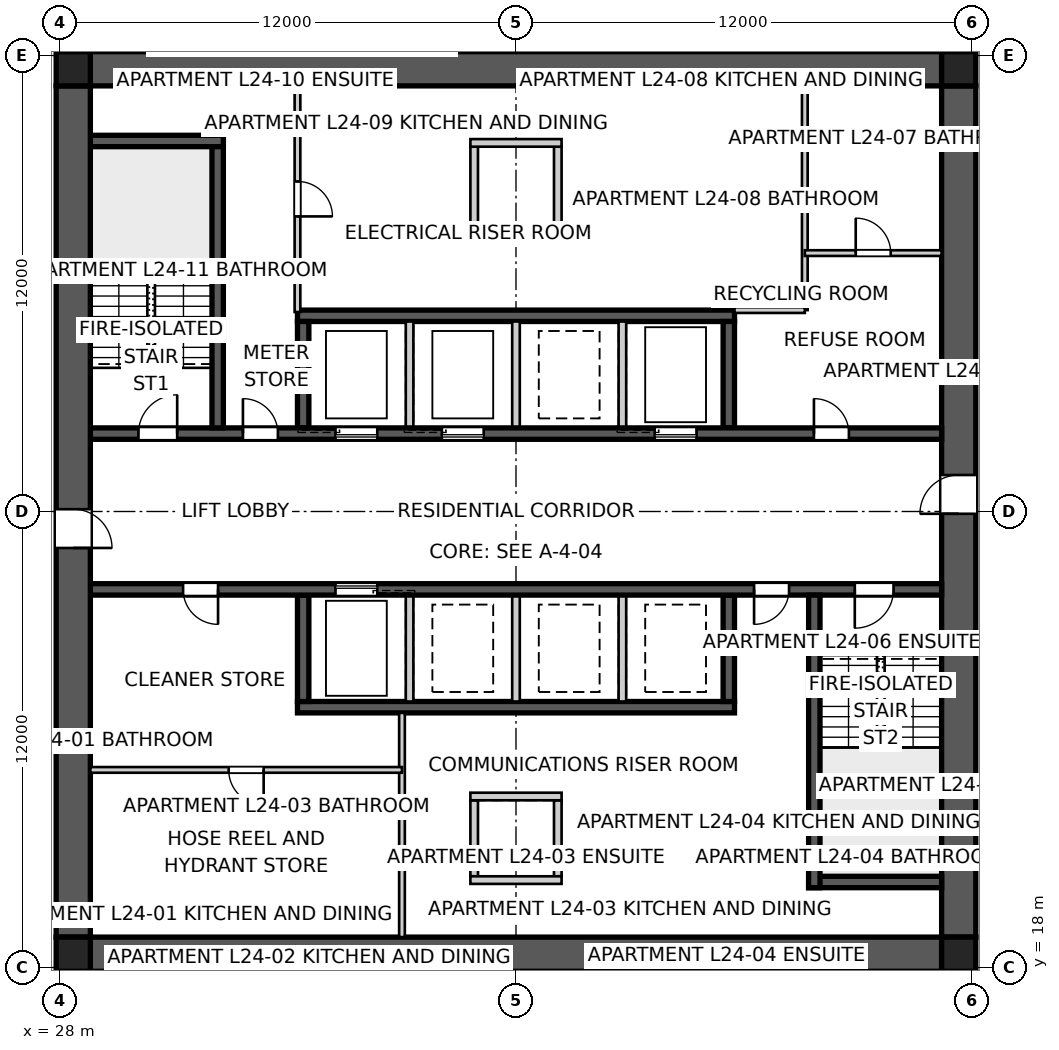
"""IFC4 building model, lengths in metres.
Left out: names, types, materials, properties, quantities, classifications, styles, units other than length and angle.
Written with IfcOpenShell. Run it as: python <this file> out.ifc"""

import sys

from ifc_helpers import new_model, si_unit, direction, frame, frame_2d, origin, origin_2d, place, context, subcontext, project, spatial, polyline, rectangle, outline, extrude, element, fill, save


model = new_model("IFC4")
c1 = context("Model", 3, precision=1e-05, world=origin(), true_north=direction((0.0, 1.0)))
c2 = subcontext(c1, "Body", "Model", "MODEL_VIEW")
j1 = project(units=[si_unit("LENGTHUNIT", "METRE"), si_unit("PLANEANGLEUNIT", "RADIAN")], contexts=[c1])
p1 = place(None, origin())
s1 = spatial("IfcSite", under=j1, at=p1, CompositionType="ELEMENT")
p2 = place(p1, origin())
s2 = spatial("IfcBuilding", under=s1, at=p2, CompositionType="ELEMENT")
p3 = place(p2, frame((0.0, 0.0, 89.6)))
s3 = spatial("IfcBuildingStorey", under=s2, at=p3, CompositionType="ELEMENT", Elevation=89.6)
for number, where, z_axis, x_axis in (
    (1, (28.8, 41.65, 0.0), (0.0, 0.0, 1.0), (1.0, 0.0, 0.0)),
    (2, (51.2, 18.35, 0.0), (0.0, 0.0, 1.0), (-1.0, 0.0, 0.0)),
):
    element("IfcWall", number, at=place(p3, frame(where, z_axis=z_axis, x_axis=x_axis)), inside=s3, PredefinedType="SHEAR", context=c2, shape_type="SweptSolid", body=[
        extrude(outline(polyline([(0.0, -0.45), (22.4, -0.45), (22.4, -0.025), (22.85, -0.025), (22.85, 0.025), (22.4, 0.025), (22.4, 0.45), (0.0, 0.45), (0.0, 0.025), (-0.45, 0.025), (-0.45, -0.025), (0.0, -0.025), (0.0, -0.45)])), origin(), (0.0, 0.0, 1.0), 3.4),
    ])
p4 = place(p3, frame((51.65, 18.8, 0.0), z_axis=(0.0, 0.0, 1.0), x_axis=(0.0, 1.0, 0.0)))
e3 = element("IfcWall", 3, at=p4, inside=s3, PredefinedType="SHEAR", context=c2, shape_type="SweptSolid", body=[
    extrude(outline(polyline([(0.0, -0.45), (22.4, -0.45), (22.4, -0.025), (22.85, -0.025), (22.85, 0.025), (22.4, 0.025), (22.4, 0.45), (0.0, 0.45), (0.0, 0.025), (-0.45, 0.025), (-0.45, -0.025), (0.0, -0.025), (0.0, -0.45)])), origin(), (0.0, 0.0, 1.0), 3.4),
])
p5 = place(p4, frame((11.14, 0.0, 0.0)))
e4 = element("IfcOpeningElement", 4, at=p5, cuts=e3, PredefinedType="OPENING", context=c2, shape_type="SweptSolid", body=[
    extrude(rectangle(XDim=1.02, YDim=2.4, at=frame_2d((0.51, 1.2))), frame((0.0, 0.46, 0.0), z_axis=(0.0, -1.0, 0.0), x_axis=(1.0, 0.0, 0.0)), (0.0, 0.0, 1.0), 0.92),
])
p6 = place(p3, frame((28.35, 41.2, 0.0), z_axis=(0.0, 0.0, 1.0), x_axis=(0.0, -1.0, 0.0)))
e5 = element("IfcWall", 5, at=p6, inside=s3, PredefinedType="SHEAR", context=c2, shape_type="SweptSolid", body=[
    extrude(outline(polyline([(0.0, -0.45), (22.4, -0.45), (22.4, -0.025), (22.85, -0.025), (22.85, 0.025), (22.4, 0.025), (22.4, 0.45), (0.0, 0.45), (0.0, 0.025), (-0.45, 0.025), (-0.45, -0.025), (0.0, -0.025), (0.0, -0.45)])), origin(), (0.0, 0.0, 1.0), 3.4),
])
p7 = place(p6, frame((11.14, 0.0, 0.0)))
e6 = element("IfcOpeningElement", 6, at=p7, cuts=e5, PredefinedType="OPENING", context=c2, shape_type="SweptSolid", body=[
    extrude(rectangle(XDim=1.02, YDim=2.4, at=frame_2d((0.51, 1.2))), frame((0.0, 0.46, 0.0), z_axis=(0.0, -1.0, 0.0), x_axis=(1.0, 0.0, 0.0)), (0.0, 0.0, 1.0), 0.92),
])
p8 = place(p3, frame((28.8, 32.05, 0.0), z_axis=(0.0, 0.0, 1.0), x_axis=(1.0, 0.0, 0.0)))
e7 = element("IfcWall", 7, at=p8, inside=s3, PredefinedType="SHEAR", context=c2, shape_type="SweptSolid", body=[
    extrude(rectangle(XDim=22.4, YDim=0.3, at=frame_2d((11.2, 0.0))), origin(), (0.0, 0.0, 1.0), 3.4),
])
p9 = place(p8, frame((19.04, 0.0, 0.0)))
e8 = element("IfcOpeningElement", 8, at=p9, cuts=e7, PredefinedType="OPENING", context=c2, shape_type="SweptSolid", body=[
    extrude(rectangle(XDim=0.92, YDim=2.1, at=frame_2d((0.46, 1.05))), frame((0.0, 0.16, 0.0), z_axis=(0.0, -1.0, 0.0), x_axis=(1.0, 0.0, 0.0)), (0.0, 0.0, 1.0), 0.32),
])
p10 = place(p8, frame((1.265, 0.0, 0.0)))
e9 = element("IfcOpeningElement", 9, at=p10, cuts=e7, PredefinedType="OPENING", context=c2, shape_type="SweptSolid", body=[
    extrude(rectangle(XDim=1.02, YDim=2.1, at=frame_2d((0.51, 1.05))), frame((0.0, 0.16, 0.0), z_axis=(0.0, -1.0, 0.0), x_axis=(1.0, 0.0, 0.0)), (0.0, 0.0, 1.0), 0.32),
])
p11 = place(p8, frame((4.015, 0.0, 0.0)))
e10 = element("IfcOpeningElement", 10, at=p11, cuts=e7, PredefinedType="OPENING", context=c2, shape_type="SweptSolid", body=[
    extrude(rectangle(XDim=0.92, YDim=2.1, at=frame_2d((0.46, 1.05))), frame((0.0, 0.16, 0.0), z_axis=(0.0, -1.0, 0.0), x_axis=(1.0, 0.0, 0.0)), (0.0, 0.0, 1.0), 0.32),
])
p12 = place(p8, frame((6.45, 0.0, 0.0)))
e11 = element("IfcOpeningElement", 11, at=p12, cuts=e7, PredefinedType="OPENING", context=c2, shape_type="SweptSolid", body=[
    extrude(rectangle(XDim=1.1, YDim=2.1, at=frame_2d((0.55, 1.05))), frame((0.0, 0.16, 0.0), z_axis=(0.0, -1.0, 0.0), x_axis=(1.0, 0.0, 0.0)), (0.0, 0.0, 1.0), 0.32),
])
p13 = place(p8, frame((9.25, 0.0, 0.0)))
e12 = element("IfcOpeningElement", 12, at=p13, cuts=e7, PredefinedType="OPENING", context=c2, shape_type="SweptSolid", body=[
    extrude(rectangle(XDim=1.1, YDim=2.1, at=frame_2d((0.55, 1.05))), frame((0.0, 0.16, 0.0), z_axis=(0.0, -1.0, 0.0), x_axis=(1.0, 0.0, 0.0)), (0.0, 0.0, 1.0), 0.32),
])
p14 = place(p8, frame((14.85, 0.0, 0.0)))
e13 = element("IfcOpeningElement", 13, at=p14, cuts=e7, PredefinedType="OPENING", context=c2, shape_type="SweptSolid", body=[
    extrude(rectangle(XDim=1.1, YDim=2.1, at=frame_2d((0.55, 1.05))), frame((0.0, 0.16, 0.0), z_axis=(0.0, -1.0, 0.0), x_axis=(1.0, 0.0, 0.0)), (0.0, 0.0, 1.0), 0.32),
])
p15 = place(p3, frame((51.2, 27.95, 0.0), z_axis=(0.0, 0.0, 1.0), x_axis=(-1.0, 0.0, 0.0)))
e14 = element("IfcWall", 14, at=p15, inside=s3, PredefinedType="SHEAR", context=c2, shape_type="SweptSolid", body=[
    extrude(rectangle(XDim=22.4, YDim=0.3, at=frame_2d((11.2, 0.0))), origin(), (0.0, 0.0, 1.0), 3.4),
])
p16 = place(p15, frame((19.04, 0.0, 0.0)))
e15 = element("IfcOpeningElement", 15, at=p16, cuts=e14, PredefinedType="OPENING", context=c2, shape_type="SweptSolid", body=[
    extrude(rectangle(XDim=0.92, YDim=2.1, at=frame_2d((0.46, 1.05))), frame((0.0, 0.16, 0.0), z_axis=(0.0, -1.0, 0.0), x_axis=(1.0, 0.0, 0.0)), (0.0, 0.0, 1.0), 0.32),
])
p17 = place(p15, frame((1.265, 0.0, 0.0)))
e16 = element("IfcOpeningElement", 16, at=p17, cuts=e14, PredefinedType="OPENING", context=c2, shape_type="SweptSolid", body=[
    extrude(rectangle(XDim=1.02, YDim=2.1, at=frame_2d((0.51, 1.05))), frame((0.0, 0.16, 0.0), z_axis=(0.0, -1.0, 0.0), x_axis=(1.0, 0.0, 0.0)), (0.0, 0.0, 1.0), 0.32),
])
p18 = place(p15, frame((4.015, 0.0, 0.0)))
e17 = element("IfcOpeningElement", 17, at=p18, cuts=e14, PredefinedType="OPENING", context=c2, shape_type="SweptSolid", body=[
    extrude(rectangle(XDim=0.92, YDim=2.1, at=frame_2d((0.46, 1.05))), frame((0.0, 0.16, 0.0), z_axis=(0.0, -1.0, 0.0), x_axis=(1.0, 0.0, 0.0)), (0.0, 0.0, 1.0), 0.32),
])
p19 = place(p15, frame((14.85, 0.0, 0.0)))
e18 = element("IfcOpeningElement", 18, at=p19, cuts=e14, PredefinedType="OPENING", context=c2, shape_type="SweptSolid", body=[
    extrude(rectangle(XDim=1.1, YDim=2.1, at=frame_2d((0.55, 1.05))), frame((0.0, 0.16, 0.0), z_axis=(0.0, -1.0, 0.0), x_axis=(1.0, 0.0, 0.0)), (0.0, 0.0, 1.0), 0.32),
])
for number, where, z_axis, x_axis in (
    (19, (34.25, 35.15, 0.0), (0.0, 0.0, 1.0), (1.0, 0.0, 0.0)),
    (20, (45.75, 24.85, 0.0), (0.0, 0.0, 1.0), (-1.0, 0.0, 0.0)),
):
    element("IfcWall", number, at=place(p3, frame(where, z_axis=z_axis, x_axis=x_axis)), inside=s3, PredefinedType="SHEAR", context=c2, shape_type="SweptSolid", body=[
        extrude(rectangle(XDim=11.5, YDim=0.3, at=frame_2d((5.75, 0.0))), origin(), (0.0, 0.0, 1.0), 3.4),
    ])
for number, where, z_axis, x_axis in (
    (21, (34.4, 32.2, 0.0), (0.0, 0.0, 1.0), (0.0, 1.0, 0.0)),
    (22, (45.6, 27.8, 0.0), (0.0, 0.0, 1.0), (0.0, -1.0, 0.0)),
):
    element("IfcWall", number, at=place(p3, frame(where, z_axis=z_axis, x_axis=x_axis)), inside=s3, PredefinedType="SHEAR", context=c2, shape_type="SweptSolid", body=[
        extrude(rectangle(XDim=2.8, YDim=0.3, at=frame_2d((1.4, 0.0))), origin(), (0.0, 0.0, 1.0), 3.4),
    ])
for number, where, z_axis, x_axis in (
    (23, (37.2, 32.2, 0.0), (0.0, 0.0, 1.0), (0.0, 1.0, 0.0)),
    (24, (42.8, 27.8, 0.0), (0.0, 0.0, 1.0), (0.0, -1.0, 0.0)),
    (25, (40.0, 32.2, 0.0), (0.0, 0.0, 1.0), (0.0, 1.0, 0.0)),
    (26, (40.0, 27.8, 0.0), (0.0, 0.0, 1.0), (0.0, -1.0, 0.0)),
    (27, (42.8, 32.2, 0.0), (0.0, 0.0, 1.0), (0.0, 1.0, 0.0)),
    (28, (37.2, 27.8, 0.0), (0.0, 0.0, 1.0), (0.0, -1.0, 0.0)),
):
    element("IfcWall", number, at=place(p3, frame(where, z_axis=z_axis, x_axis=x_axis)), inside=s3, PredefinedType="SOLIDWALL", context=c2, shape_type="SweptSolid", body=[
        extrude(rectangle(XDim=2.8, YDim=0.2, at=frame_2d((1.4, 0.0))), origin(), (0.0, 0.0, 1.0), 3.4),
    ])
for number, where, z_axis, x_axis in (
    (29, (45.6, 32.2, 0.0), (0.0, 0.0, 1.0), (0.0, 1.0, 0.0)),
    (30, (34.4, 27.8, 0.0), (0.0, 0.0, 1.0), (0.0, -1.0, 0.0)),
):
    element("IfcWall", number, at=place(p3, frame(where, z_axis=z_axis, x_axis=x_axis)), inside=s3, PredefinedType="SHEAR", context=c2, shape_type="SweptSolid", body=[
        extrude(rectangle(XDim=2.8, YDim=0.3, at=frame_2d((1.4, 0.0))), origin(), (0.0, 0.0, 1.0), 3.4),
    ])
p20 = place(p3, frame((32.15, 32.2, 0.0), z_axis=(0.0, 0.0, 1.0), x_axis=(0.0, 1.0, 0.0)))
e31 = element("IfcWall", 31, at=p20, inside=s3, PredefinedType="SHEAR", context=c2, shape_type="SweptSolid", body=[
    extrude(rectangle(XDim=7.7, YDim=0.3, at=frame_2d((3.85, 0.0))), origin(), (0.0, 0.0, 1.0), 3.4),
])
p21 = place(p3, frame((28.8, 39.75, 0.0), z_axis=(0.0, 0.0, 1.0), x_axis=(1.0, 0.0, 0.0)))
e32 = element("IfcWall", 32, at=p21, inside=s3, PredefinedType="SHEAR", context=c2, shape_type="SweptSolid", body=[
    extrude(rectangle(XDim=3.5, YDim=0.3, at=frame_2d((1.75, 0.0))), origin(), (0.0, 0.0, 1.0), 3.4),
])
p22 = place(p3, frame((47.85, 27.8, 0.0), z_axis=(0.0, 0.0, 1.0), x_axis=(0.0, -1.0, 0.0)))
e33 = element("IfcWall", 33, at=p22, inside=s3, PredefinedType="SHEAR", context=c2, shape_type="SweptSolid", body=[
    extrude(rectangle(XDim=7.7, YDim=0.3, at=frame_2d((3.85, 0.0))), origin(), (0.0, 0.0, 1.0), 3.4),
])
p23 = place(p3, frame((51.2, 20.25, 0.0), z_axis=(0.0, 0.0, 1.0), x_axis=(-1.0, 0.0, 0.0)))
e34 = element("IfcWall", 34, at=p23, inside=s3, PredefinedType="SHEAR", context=c2, shape_type="SweptSolid", body=[
    extrude(rectangle(XDim=3.5, YDim=0.3, at=frame_2d((1.75, 0.0))), origin(), (0.0, 0.0, 1.0), 3.4),
])
for number, where, z_axis, x_axis in (
    (35, (38.9, 37.6, 0.0), (0.0, 0.0, 1.0), (0.0, 1.0, 0.0)),
    (36, (41.1, 37.6, 0.0), (0.0, 0.0, 1.0), (0.0, 1.0, 0.0)),
):
    element("IfcWall", number, at=place(p3, frame(where, z_axis=z_axis, x_axis=x_axis)), inside=s3, PredefinedType="SOLIDWALL", context=c2, shape_type="SweptSolid", body=[
        extrude(rectangle(XDim=2.0, YDim=0.2, at=frame_2d((1.0, 0.0))), origin(), (0.0, 0.0, 1.0), 3.4),
    ])
for number, where, z_axis, x_axis in (
    (37, (38.8, 37.5, 0.0), (0.0, 0.0, 1.0), (1.0, 0.0, 0.0)),
    (38, (38.8, 39.7, 0.0), (0.0, 0.0, 1.0), (1.0, 0.0, 0.0)),
):
    element("IfcWall", number, at=place(p3, frame(where, z_axis=z_axis, x_axis=x_axis)), inside=s3, PredefinedType="SOLIDWALL", context=c2, shape_type="SweptSolid", body=[
        extrude(rectangle(XDim=2.4, YDim=0.2, at=frame_2d((1.2, 0.0))), origin(), (0.0, 0.0, 1.0), 3.4),
    ])
for number, where, z_axis, x_axis in (
    (39, (38.9, 22.4, 0.0), (0.0, 0.0, 1.0), (0.0, -1.0, 0.0)),
    (40, (41.1, 22.4, 0.0), (0.0, 0.0, 1.0), (0.0, -1.0, 0.0)),
):
    element("IfcWall", number, at=place(p3, frame(where, z_axis=z_axis, x_axis=x_axis)), inside=s3, PredefinedType="SOLIDWALL", context=c2, shape_type="SweptSolid", body=[
        extrude(rectangle(XDim=2.0, YDim=0.2, at=frame_2d((1.0, 0.0))), origin(), (0.0, 0.0, 1.0), 3.4),
    ])
for number, where, z_axis, x_axis in (
    (41, (38.8, 22.5, 0.0), (0.0, 0.0, 1.0), (1.0, 0.0, 0.0)),
    (42, (38.8, 20.3, 0.0), (0.0, 0.0, 1.0), (1.0, 0.0, 0.0)),
):
    element("IfcWall", number, at=place(p3, frame(where, z_axis=z_axis, x_axis=x_axis)), inside=s3, PredefinedType="SOLIDWALL", context=c2, shape_type="SweptSolid", body=[
        extrude(rectangle(XDim=2.4, YDim=0.2, at=frame_2d((1.2, 0.0))), origin(), (0.0, 0.0, 1.0), 3.4),
    ])
for number, where, z_axis, x_axis in (
    (43, (28.35, 18.35, 0.0), (0.0, 0.0, 1.0), (1.0, 0.0, 0.0)),
    (44, (51.65, 18.35, 0.0), (0.0, 0.0, 1.0), (1.0, 0.0, 0.0)),
    (45, (51.65, 41.65, 0.0), (0.0, 0.0, 1.0), (1.0, 0.0, 0.0)),
    (46, (28.35, 41.65, 0.0), (0.0, 0.0, 1.0), (1.0, 0.0, 0.0)),
):
    element("IfcColumn", number, at=place(p3, frame(where, z_axis=z_axis, x_axis=x_axis)), inside=s3, PredefinedType="COLUMN", context=c2, shape_type="SweptSolid", body=[
        extrude(rectangle(XDim=0.9, YDim=0.9, at=origin_2d()), origin(), (0.0, 0.0, 1.0), 3.4),
    ])
p24 = place(p3, frame((34.25, 41.2, 0.0), z_axis=(0.0, 0.0, 1.0), x_axis=(0.0, -1.0, 0.0)))
e47 = element("IfcWall", 47, at=p24, inside=s3, PredefinedType="SOLIDWALL", context=c2, shape_type="SweptSolid", body=[
    extrude(rectangle(XDim=5.95, YDim=0.15, at=frame_2d((2.975, 0.0))), origin(), (0.0, 0.0, 1.0), 3.25),
])
p25 = place(p24, frame((2.515, 0.0, 0.0)))
e48 = element("IfcOpeningElement", 48, at=p25, cuts=e47, PredefinedType="OPENING", context=c2, shape_type="SweptSolid", body=[
    extrude(rectangle(XDim=0.92, YDim=2.1, at=frame_2d((0.46, 1.05))), frame((0.0, 0.085, 0.0), z_axis=(0.0, -1.0, 0.0), x_axis=(1.0, 0.0, 0.0)), (0.0, 0.0, 1.0), 0.17),
])
p26 = place(p3, frame((47.6, 41.2, 0.0), z_axis=(0.0, 0.0, 1.0), x_axis=(0.0, -1.0, 0.0)))
e49 = element("IfcWall", 49, at=p26, inside=s3, PredefinedType="SOLIDWALL", context=c2, shape_type="SweptSolid", body=[
    extrude(rectangle(XDim=5.9, YDim=0.15, at=frame_2d((2.95, 0.0))), origin(), (0.0, 0.0, 1.0), 3.25),
])
p27 = place(p3, frame((47.6, 35.3, 0.0), z_axis=(0.0, 0.0, 1.0), x_axis=(-1.0, 0.0, 0.0)))
e50 = element("IfcWall", 50, at=p27, inside=s3, PredefinedType="SOLIDWALL", context=c2, shape_type="SweptSolid", body=[
    extrude(rectangle(XDim=1.85, YDim=0.15, at=frame_2d((0.925, 0.0))), origin(), (0.0, 0.0, 1.0), 3.25),
])
p28 = place(p3, frame((47.6, 36.8, 0.0), z_axis=(0.0, 0.0, 1.0), x_axis=(1.0, 0.0, 0.0)))
e51 = element("IfcWall", 51, at=p28, inside=s3, PredefinedType="SOLIDWALL", context=c2, shape_type="SweptSolid", body=[
    extrude(rectangle(XDim=3.6, YDim=0.15, at=frame_2d((1.8, 0.0))), origin(), (0.0, 0.0, 1.0), 3.25),
])
p29 = place(p28, frame((1.34, 0.0, 0.0)))
e52 = element("IfcOpeningElement", 52, at=p29, cuts=e51, PredefinedType="OPENING", context=c2, shape_type="SweptSolid", body=[
    extrude(rectangle(XDim=0.92, YDim=2.1, at=frame_2d((0.46, 1.05))), frame((0.0, 0.085, 0.0), z_axis=(0.0, -1.0, 0.0), x_axis=(1.0, 0.0, 0.0)), (0.0, 0.0, 1.0), 0.17),
])
p30 = place(p3, frame((37.0, 18.8, 0.0), z_axis=(0.0, 0.0, 1.0), x_axis=(0.0, 1.0, 0.0)))
e53 = element("IfcWall", 53, at=p30, inside=s3, PredefinedType="SOLIDWALL", context=c2, shape_type="SweptSolid", body=[
    extrude(rectangle(XDim=5.9, YDim=0.15, at=frame_2d((2.95, 0.0))), origin(), (0.0, 0.0, 1.0), 3.25),
])
p31 = place(p3, frame((37.0, 23.2, 0.0), z_axis=(0.0, 0.0, 1.0), x_axis=(-1.0, 0.0, 0.0)))
e54 = element("IfcWall", 54, at=p31, inside=s3, PredefinedType="SOLIDWALL", context=c2, shape_type="SweptSolid", body=[
    extrude(rectangle(XDim=8.2, YDim=0.15, at=frame_2d((4.1, 0.0))), origin(), (0.0, 0.0, 1.0), 3.25),
])
p32 = place(p31, frame((3.64, 0.0, 0.0)))
e55 = element("IfcOpeningElement", 55, at=p32, cuts=e54, PredefinedType="OPENING", context=c2, shape_type="SweptSolid", body=[
    extrude(rectangle(XDim=0.92, YDim=2.1, at=frame_2d((0.46, 1.05))), frame((0.0, 0.085, 0.0), z_axis=(0.0, -1.0, 0.0), x_axis=(1.0, 0.0, 0.0)), (0.0, 0.0, 1.0), 0.17),
])
p33 = place(p9, origin())
e56 = element("IfcDoor", 56, at=p33, inside=s3, OperationType="SINGLE_SWING_LEFT", PredefinedType="DOOR", context=c2, shape_type="SweptSolid", body=[
    extrude(rectangle(XDim=0.92, YDim=2.1, at=frame_2d((0.46, 1.05))), frame((0.0, 0.025, 0.0), z_axis=(0.0, -1.0, 0.0), x_axis=(1.0, 0.0, 0.0)), (0.0, 0.0, 1.0), 0.05),
])
fill(e8, e56)
p34 = place(p16, origin())
e57 = element("IfcDoor", 57, at=p34, inside=s3, OperationType="SINGLE_SWING_LEFT", PredefinedType="DOOR", context=c2, shape_type="SweptSolid", body=[
    extrude(rectangle(XDim=0.92, YDim=2.1, at=frame_2d((0.46, 1.05))), frame((0.0, 0.025, 0.0), z_axis=(0.0, -1.0, 0.0), x_axis=(1.0, 0.0, 0.0)), (0.0, 0.0, 1.0), 0.05),
])
fill(e15, e57)
p35 = place(p17, origin())
e58 = element("IfcDoor", 58, at=p35, inside=s3, OperationType="SINGLE_SWING_RIGHT", PredefinedType="DOOR", context=c2, shape_type="SweptSolid", body=[
    extrude(rectangle(XDim=1.02, YDim=2.1, at=frame_2d((0.51, 1.05))), frame((0.0, 0.025, 0.0), z_axis=(0.0, -1.0, 0.0), x_axis=(1.0, 0.0, 0.0)), (0.0, 0.0, 1.0), 0.05),
])
fill(e16, e58)
p36 = place(p10, origin())
e59 = element("IfcDoor", 59, at=p36, inside=s3, OperationType="SINGLE_SWING_RIGHT", PredefinedType="DOOR", context=c2, shape_type="SweptSolid", body=[
    extrude(rectangle(XDim=1.02, YDim=2.1, at=frame_2d((0.51, 1.05))), frame((0.0, 0.025, 0.0), z_axis=(0.0, -1.0, 0.0), x_axis=(1.0, 0.0, 0.0)), (0.0, 0.0, 1.0), 0.05),
])
fill(e9, e59)
p37 = place(p11, origin())
e60 = element("IfcDoor", 60, at=p37, inside=s3, OperationType="SINGLE_SWING_LEFT", PredefinedType="DOOR", context=c2, shape_type="SweptSolid", body=[
    extrude(rectangle(XDim=0.92, YDim=2.1, at=frame_2d((0.46, 1.05))), frame((0.0, 0.025, 0.0), z_axis=(0.0, -1.0, 0.0), x_axis=(1.0, 0.0, 0.0)), (0.0, 0.0, 1.0), 0.05),
])
fill(e10, e60)
p38 = place(p18, origin())
e61 = element("IfcDoor", 61, at=p38, inside=s3, OperationType="SINGLE_SWING_RIGHT", PredefinedType="DOOR", context=c2, shape_type="SweptSolid", body=[
    extrude(rectangle(XDim=0.92, YDim=2.1, at=frame_2d((0.46, 1.05))), frame((0.0, 0.025, 0.0), z_axis=(0.0, -1.0, 0.0), x_axis=(1.0, 0.0, 0.0)), (0.0, 0.0, 1.0), 0.05),
])
fill(e17, e61)
p39 = place(p29, origin())
e62 = element("IfcDoor", 62, at=p39, inside=s3, OperationType="SINGLE_SWING_LEFT", PredefinedType="DOOR", context=c2, shape_type="SweptSolid", body=[
    extrude(rectangle(XDim=0.92, YDim=2.1, at=frame_2d((0.46, 1.05))), frame((0.0, 0.025, 0.0), z_axis=(0.0, -1.0, 0.0), x_axis=(1.0, 0.0, 0.0)), (0.0, 0.0, 1.0), 0.05),
])
fill(e52, e62)
p40 = place(p32, origin())
e63 = element("IfcDoor", 63, at=p40, inside=s3, OperationType="SINGLE_SWING_LEFT", PredefinedType="DOOR", context=c2, shape_type="SweptSolid", body=[
    extrude(rectangle(XDim=0.92, YDim=2.1, at=frame_2d((0.46, 1.05))), frame((0.0, 0.025, 0.0), z_axis=(0.0, -1.0, 0.0), x_axis=(1.0, 0.0, 0.0)), (0.0, 0.0, 1.0), 0.05),
])
fill(e55, e63)
p41 = place(p25, origin())
e64 = element("IfcDoor", 64, at=p41, inside=s3, OperationType="SINGLE_SWING_RIGHT", PredefinedType="DOOR", context=c2, shape_type="SweptSolid", body=[
    extrude(rectangle(XDim=0.92, YDim=2.1, at=frame_2d((0.46, 1.05))), frame((0.0, 0.025, 0.0), z_axis=(0.0, -1.0, 0.0), x_axis=(1.0, 0.0, 0.0)), (0.0, 0.0, 1.0), 0.05),
])
fill(e48, e64)
p42 = place(p5, origin())
e65 = element("IfcDoor", 65, at=p42, inside=s3, OperationType="SINGLE_SWING_LEFT", PredefinedType="DOOR", context=c2, shape_type="SweptSolid", body=[
    extrude(rectangle(XDim=1.02, YDim=2.4, at=frame_2d((0.51, 1.2))), frame((0.0, 0.025, 0.0), z_axis=(0.0, -1.0, 0.0), x_axis=(1.0, 0.0, 0.0)), (0.0, 0.0, 1.0), 0.05),
])
fill(e4, e65)
p43 = place(p7, origin())
e66 = element("IfcDoor", 66, at=p43, inside=s3, OperationType="SINGLE_SWING_RIGHT", PredefinedType="DOOR", context=c2, shape_type="SweptSolid", body=[
    extrude(rectangle(XDim=1.02, YDim=2.4, at=frame_2d((0.51, 1.2))), frame((0.0, 0.025, 0.0), z_axis=(0.0, -1.0, 0.0), x_axis=(1.0, 0.0, 0.0)), (0.0, 0.0, 1.0), 0.05),
])
fill(e6, e66)
p44 = place(p12, origin())
e67 = element("IfcDoor", 67, at=p44, inside=s3, OperationType="SLIDING_TO_LEFT", PredefinedType="DOOR", context=c2, shape_type="SweptSolid", body=[
    extrude(rectangle(XDim=1.1, YDim=2.1, at=frame_2d((0.55, 1.05))), frame((0.0, 0.025, 0.0), z_axis=(0.0, -1.0, 0.0), x_axis=(1.0, 0.0, 0.0)), (0.0, 0.0, 1.0), 0.05),
])
fill(e11, e67)
p45 = place(p13, origin())
e68 = element("IfcDoor", 68, at=p45, inside=s3, OperationType="SLIDING_TO_LEFT", PredefinedType="DOOR", context=c2, shape_type="SweptSolid", body=[
    extrude(rectangle(XDim=1.1, YDim=2.1, at=frame_2d((0.55, 1.05))), frame((0.0, 0.025, 0.0), z_axis=(0.0, -1.0, 0.0), x_axis=(1.0, 0.0, 0.0)), (0.0, 0.0, 1.0), 0.05),
])
fill(e12, e68)
p46 = place(p14, origin())
e69 = element("IfcDoor", 69, at=p46, inside=s3, OperationType="SLIDING_TO_LEFT", PredefinedType="DOOR", context=c2, shape_type="SweptSolid", body=[
    extrude(rectangle(XDim=1.1, YDim=2.1, at=frame_2d((0.55, 1.05))), frame((0.0, 0.025, 0.0), z_axis=(0.0, -1.0, 0.0), x_axis=(1.0, 0.0, 0.0)), (0.0, 0.0, 1.0), 0.05),
])
fill(e13, e69)
p47 = place(p19, origin())
e70 = element("IfcDoor", 70, at=p47, inside=s3, OperationType="SLIDING_TO_LEFT", PredefinedType="DOOR", context=c2, shape_type="SweptSolid", body=[
    extrude(rectangle(XDim=1.1, YDim=2.1, at=frame_2d((0.55, 1.05))), frame((0.0, 0.025, 0.0), z_axis=(0.0, -1.0, 0.0), x_axis=(1.0, 0.0, 0.0)), (0.0, 0.0, 1.0), 0.05),
])
fill(e18, e70)
save(model, sys.argv[1])
